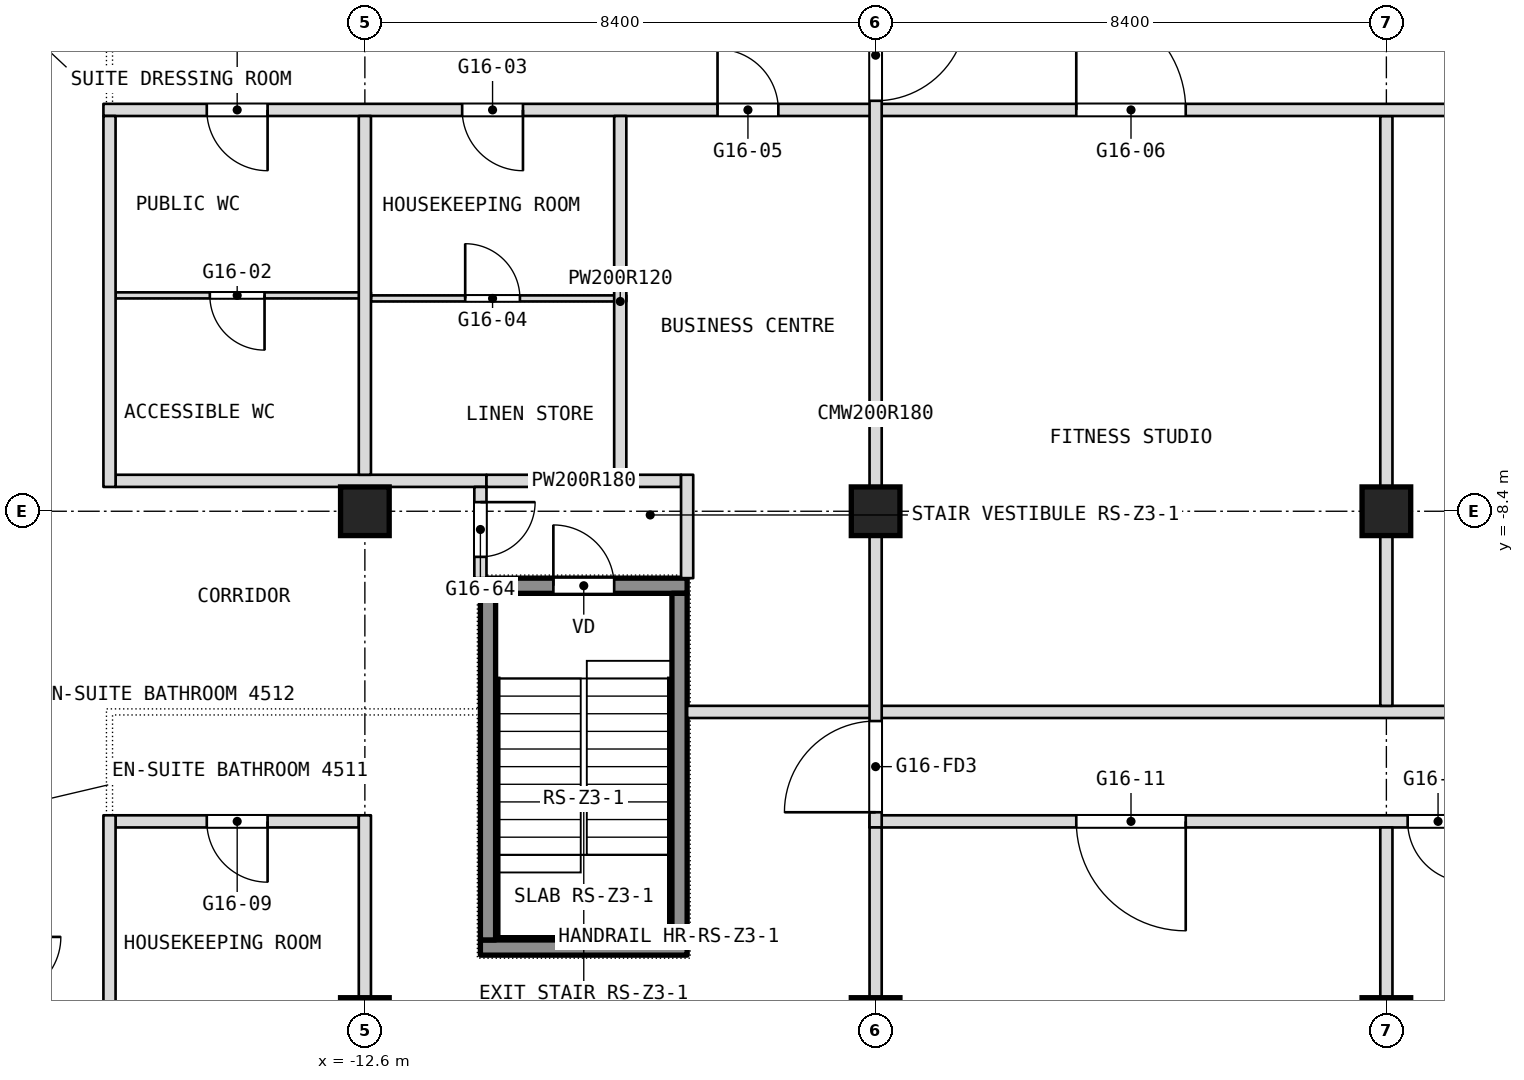
"""IFC4 building model, lengths in metres.
Left out: names, types, materials, properties, quantities, classifications, styles, units other than length and angle.
Written with IfcOpenShell. Run it as: python <this file> out.ifc"""

import sys

from ifc_helpers import new_model, si_unit, direction, frame, frame_2d, origin, origin_2d, place, context, subcontext, project, spatial, rectangle, extrude, element, fill, save


model = new_model("IFC4")
c1 = context("Model", 3, precision=1e-05, world=origin(), true_north=direction((0.0, 1.0)))
c2 = subcontext(c1, "Body", "Model", "MODEL_VIEW")
j1 = project(units=[si_unit("LENGTHUNIT", "METRE"), si_unit("PLANEANGLEUNIT", "RADIAN")], contexts=[c1])
p1 = place(None, origin())
s1 = spatial("IfcSite", under=j1, at=p1, CompositionType="ELEMENT")
p2 = place(p1, origin())
s2 = spatial("IfcBuilding", under=s1, at=p2, CompositionType="ELEMENT")
p3 = place(p2, frame((0.0, 0.0, 198.5)))
s3 = spatial("IfcBuildingStorey", under=s2, at=p3, CompositionType="ELEMENT", Elevation=198.5)
for number, where, z_axis, x_axis in (
    (1, (-12.6, -16.8, 0.0), (0.0, 0.0, 1.0), (1.0, 0.0, 0.0)),
    (2, (-12.6, -8.4, 0.0), (0.0, 0.0, 1.0), (1.0, 0.0, 0.0)),
    (3, (-4.2, -16.8, 0.0), (0.0, 0.0, 1.0), (1.0, 0.0, 0.0)),
    (4, (-4.2, -8.4, 0.0), (0.0, 0.0, 1.0), (1.0, 0.0, 0.0)),
    (5, (4.2, -16.8, 0.0), (0.0, 0.0, 1.0), (1.0, 0.0, 0.0)),
    (6, (4.2, -8.4, 0.0), (0.0, 0.0, 1.0), (1.0, 0.0, 0.0)),
):
    element("IfcColumn", number, at=place(p3, frame(where, z_axis=z_axis, x_axis=x_axis)), inside=s3, PredefinedType="COLUMN", context=c2, shape_type="SweptSolid", body=[
        extrude(rectangle(XDim=0.8, YDim=0.8, at=origin_2d()), origin(), (0.0, 0.0, 1.0), 3.6),
    ])
p4 = place(p3, frame((-16.7, -13.5, 0.0), z_axis=(0.0, 0.0, 1.0), x_axis=(1.0, 0.0, 0.0)))
e7 = element("IfcWall", 7, at=p4, inside=s3, PredefinedType="PARTITIONING", context=c2, shape_type="SweptSolid", body=[
    extrude(rectangle(XDim=4.0, YDim=0.2, at=frame_2d((2.0, 0.0))), origin(), (0.0, 0.0, 1.0), 3.34),
])
p5 = place(p4, frame((1.5, 0.0, 0.0)))
e8 = element("IfcOpeningElement", 8, at=p5, cuts=e7, PredefinedType="OPENING", context=c2, shape_type="SweptSolid", body=[
    extrude(rectangle(XDim=1.0, YDim=2.1, at=frame_2d((0.5, 1.05))), frame((0.0, 0.1, 0.0), z_axis=(0.0, -1.0, 0.0), x_axis=(1.0, 0.0, 0.0)), (0.0, 0.0, 1.0), 0.2),
])
p6 = place(p3, frame((-4.3, -13.5, 0.0), z_axis=(0.0, 0.0, 1.0), x_axis=(1.0, 0.0, 0.0)))
e9 = element("IfcWall", 9, at=p6, inside=s3, PredefinedType="PARTITIONING", context=c2, shape_type="SweptSolid", body=[
    extrude(rectangle(XDim=10.0, YDim=0.2, at=frame_2d((5.0, 0.0))), origin(), (0.0, 0.0, 1.0), 3.34),
])
p7 = place(p6, frame((3.4, 0.0, 0.0)))
e10 = element("IfcOpeningElement", 10, at=p7, cuts=e9, PredefinedType="OPENING", context=c2, shape_type="SweptSolid", body=[
    extrude(rectangle(XDim=1.8, YDim=2.1, at=frame_2d((0.9, 1.05))), frame((0.0, 0.1, 0.0), z_axis=(0.0, -1.0, 0.0), x_axis=(1.0, 0.0, 0.0)), (0.0, 0.0, 1.0), 0.2),
])
p8 = place(p6, frame((8.85, 0.0, 0.0)))
e11 = element("IfcOpeningElement", 11, at=p8, cuts=e9, PredefinedType="OPENING", context=c2, shape_type="SweptSolid", body=[
    extrude(rectangle(XDim=1.0, YDim=2.1, at=frame_2d((0.5, 1.05))), frame((0.0, 0.1, 0.0), z_axis=(0.0, -1.0, 0.0), x_axis=(1.0, 0.0, 0.0)), (0.0, 0.0, 1.0), 0.2),
])
p9 = place(p3, frame((-7.3, -11.7, 0.0), z_axis=(0.0, 0.0, 1.0), x_axis=(1.0, 0.0, 0.0)))
e12 = element("IfcWall", 12, at=p9, inside=s3, PredefinedType="PARTITIONING", context=c2, shape_type="SweptSolid", body=[
    extrude(rectangle(XDim=14.6, YDim=0.2, at=frame_2d((7.3, 0.0))), origin(), (0.0, 0.0, 1.0), 3.34),
])
p10 = place(p3, frame((-16.7, -7.9, 0.0), z_axis=(0.0, 0.0, 1.0), x_axis=(1.0, 0.0, 0.0)))
e13 = element("IfcWall", 13, at=p10, inside=s3, PredefinedType="PARTITIONING", context=c2, shape_type="SweptSolid", body=[
    extrude(rectangle(XDim=6.1, YDim=0.2, at=frame_2d((3.05, 0.0))), origin(), (0.0, 0.0, 1.0), 3.34),
])
p11 = place(p3, frame((-10.6, -7.9, 0.0), z_axis=(0.0, 0.0, 1.0), x_axis=(1.0, 0.0, 0.0)))
e14 = element("IfcWall", 14, at=p11, inside=s3, PredefinedType="PARTITIONING", context=c2, shape_type="SweptSolid", body=[
    extrude(rectangle(XDim=3.2, YDim=0.2, at=frame_2d((1.6, 0.0))), origin(), (0.0, 0.0, 1.0), 3.34),
])
p12 = place(p3, frame((-12.5, -4.9, 0.0), z_axis=(0.0, 0.0, 1.0), x_axis=(1.0, 0.0, 0.0)))
e15 = element("IfcWall", 15, at=p12, inside=s3, PredefinedType="PARTITIONING", context=c2, shape_type="SweptSolid", body=[
    extrude(rectangle(XDim=4.2, YDim=0.1, at=frame_2d((2.1, 0.0))), origin(), (0.0, 0.0, 1.0), 3.34),
])
p13 = place(p12, frame((1.55, 0.0, 0.0)))
e16 = element("IfcOpeningElement", 16, at=p13, cuts=e15, PredefinedType="OPENING", context=c2, shape_type="SweptSolid", body=[
    extrude(rectangle(XDim=0.9, YDim=2.1, at=frame_2d((0.45, 1.05))), frame((0.0, 0.05, 0.0), z_axis=(0.0, -1.0, 0.0), x_axis=(1.0, 0.0, 0.0)), (0.0, 0.0, 1.0), 0.1),
])
p14 = place(p3, frame((-16.7, -4.85, 0.0), z_axis=(0.0, 0.0, 1.0), x_axis=(1.0, 0.0, 0.0)))
e17 = element("IfcWall", 17, at=p14, inside=s3, PredefinedType="PARTITIONING", context=c2, shape_type="SweptSolid", body=[
    extrude(rectangle(XDim=4.2, YDim=0.1, at=frame_2d((2.1, 0.0))), origin(), (0.0, 0.0, 1.0), 3.34),
])
p15 = place(p14, frame((1.55, 0.0, 0.0)))
e18 = element("IfcOpeningElement", 18, at=p15, cuts=e17, PredefinedType="OPENING", context=c2, shape_type="SweptSolid", body=[
    extrude(rectangle(XDim=0.9, YDim=2.1, at=frame_2d((0.45, 1.05))), frame((0.0, 0.05, 0.0), z_axis=(0.0, -1.0, 0.0), x_axis=(1.0, 0.0, 0.0)), (0.0, 0.0, 1.0), 0.1),
])
p16 = place(p3, frame((4.2, -20.0, 0.0), z_axis=(0.0, 0.0, 1.0), x_axis=(0.0, 1.0, 0.0)))
e19 = element("IfcWall", 19, at=p16, inside=s3, PredefinedType="PARTITIONING", context=c2, shape_type="SweptSolid", body=[
    extrude(rectangle(XDim=6.4, YDim=0.2, at=frame_2d((3.2, 0.0))), origin(), (0.0, 0.0, 1.0), 3.34),
])
p17 = place(p3, frame((4.2, -11.6, 0.0), z_axis=(0.0, 0.0, 1.0), x_axis=(0.0, 1.0, 0.0)))
e20 = element("IfcWall", 20, at=p17, inside=s3, PredefinedType="PARTITIONING", context=c2, shape_type="SweptSolid", body=[
    extrude(rectangle(XDim=9.7, YDim=0.2, at=frame_2d((4.85, 0.0))), origin(), (0.0, 0.0, 1.0), 3.34),
])
p18 = place(p3, frame((-16.9, -1.8, 0.0), z_axis=(0.0, 0.0, 1.0), x_axis=(1.0, 0.0, 0.0)))
e21 = element("IfcWall", 21, at=p18, inside=s3, PredefinedType="PARTITIONING", context=c2, shape_type="SweptSolid", body=[
    extrude(rectangle(XDim=33.8, YDim=0.2, at=frame_2d((16.9, 0.0))), origin(), (0.0, 0.0, 1.0), 3.34),
])
p19 = place(p18, frame((1.7, 0.0, 0.0)))
e22 = element("IfcOpeningElement", 22, at=p19, cuts=e21, PredefinedType="OPENING", context=c2, shape_type="SweptSolid", body=[
    extrude(rectangle(XDim=1.0, YDim=2.1, at=frame_2d((0.5, 1.05))), frame((0.0, 0.1, 0.0), z_axis=(0.0, -1.0, 0.0), x_axis=(1.0, 0.0, 0.0)), (0.0, 0.0, 1.0), 0.2),
])
p20 = place(p18, frame((5.9, 0.0, 0.0)))
e23 = element("IfcOpeningElement", 23, at=p20, cuts=e21, PredefinedType="OPENING", context=c2, shape_type="SweptSolid", body=[
    extrude(rectangle(XDim=1.0, YDim=2.1, at=frame_2d((0.5, 1.05))), frame((0.0, 0.1, 0.0), z_axis=(0.0, -1.0, 0.0), x_axis=(1.0, 0.0, 0.0)), (0.0, 0.0, 1.0), 0.2),
])
p21 = place(p18, frame((10.1, 0.0, 0.0)))
e24 = element("IfcOpeningElement", 24, at=p21, cuts=e21, PredefinedType="OPENING", context=c2, shape_type="SweptSolid", body=[
    extrude(rectangle(XDim=1.0, YDim=2.1, at=frame_2d((0.5, 1.05))), frame((0.0, 0.1, 0.0), z_axis=(0.0, -1.0, 0.0), x_axis=(1.0, 0.0, 0.0)), (0.0, 0.0, 1.0), 0.2),
])
p22 = place(p18, frame((16.0, 0.0, 0.0)))
e25 = element("IfcOpeningElement", 25, at=p22, cuts=e21, PredefinedType="OPENING", context=c2, shape_type="SweptSolid", body=[
    extrude(rectangle(XDim=1.8, YDim=2.1, at=frame_2d((0.9, 1.05))), frame((0.0, 0.1, 0.0), z_axis=(0.0, -1.0, 0.0), x_axis=(1.0, 0.0, 0.0)), (0.0, 0.0, 1.0), 0.2),
])
p23 = place(p18, frame((24.4, 0.0, 0.0)))
e26 = element("IfcOpeningElement", 26, at=p23, cuts=e21, PredefinedType="OPENING", context=c2, shape_type="SweptSolid", body=[
    extrude(rectangle(XDim=1.8, YDim=2.1, at=frame_2d((0.9, 1.05))), frame((0.0, 0.1, 0.0), z_axis=(0.0, -1.0, 0.0), x_axis=(1.0, 0.0, 0.0)), (0.0, 0.0, 1.0), 0.2),
])
p24 = place(p18, frame((31.1, 0.0, 0.0)))
e27 = element("IfcOpeningElement", 27, at=p24, cuts=e21, PredefinedType="OPENING", context=c2, shape_type="SweptSolid", body=[
    extrude(rectangle(XDim=1.0, YDim=2.1, at=frame_2d((0.5, 1.05))), frame((0.0, 0.1, 0.0), z_axis=(0.0, -1.0, 0.0), x_axis=(1.0, 0.0, 0.0)), (0.0, 0.0, 1.0), 0.2),
])
p25 = place(p3, frame((-4.2, -13.6, 0.0), z_axis=(0.0, 0.0, 1.0), x_axis=(0.0, 1.0, 0.0)))
e28 = element("IfcWall", 28, at=p25, inside=s3, PredefinedType="PARTITIONING", context=c2, shape_type="SweptSolid", body=[
    extrude(rectangle(XDim=13.6, YDim=0.2, at=frame_2d((6.8, 0.0))), origin(), (0.0, 0.0, 1.0), 3.34),
])
p26 = place(p25, frame((11.95, 0.0, 0.0)))
e29 = element("IfcOpeningElement", 29, at=p26, cuts=e28, PredefinedType="OPENING", context=c2, shape_type="SweptSolid", body=[
    extrude(rectangle(XDim=1.5, YDim=2.1, at=frame_2d((0.75, 1.05))), frame((0.0, 0.1, 0.0), z_axis=(0.0, -1.0, 0.0), x_axis=(1.0, 0.0, 0.0)), (0.0, 0.0, 1.0), 0.2),
])
p27 = place(p25, frame((0.25, 0.0, 0.0)))
e30 = element("IfcOpeningElement", 30, at=p27, cuts=e28, PredefinedType="OPENING", context=c2, shape_type="SweptSolid", body=[
    extrude(rectangle(XDim=1.5, YDim=2.1, at=frame_2d((0.75, 1.05))), frame((0.0, 0.1, 0.0), z_axis=(0.0, -1.0, 0.0), x_axis=(1.0, 0.0, 0.0)), (0.0, 0.0, 1.0), 0.2),
])
p28 = place(p3, frame((-4.2, -22.0, 0.0), z_axis=(0.0, 0.0, 1.0), x_axis=(0.0, 1.0, 0.0)))
e31 = element("IfcWall", 31, at=p28, inside=s3, PredefinedType="PARTITIONING", context=c2, shape_type="SweptSolid", body=[
    extrude(rectangle(XDim=8.4, YDim=0.2, at=frame_2d((4.2, 0.0))), origin(), (0.0, 0.0, 1.0), 3.34),
])
p29 = place(p28, frame((0.225, 0.0, 0.0)))
e32 = element("IfcOpeningElement", 32, at=p29, cuts=e31, PredefinedType="OPENING", context=c2, shape_type="SweptSolid", body=[
    extrude(rectangle(XDim=1.5, YDim=2.1, at=frame_2d((0.75, 1.05))), frame((0.0, 0.1, 0.0), z_axis=(0.0, -1.0, 0.0), x_axis=(1.0, 0.0, 0.0)), (0.0, 0.0, 1.0), 0.2),
])
p30 = place(p3, frame((-7.3, -9.5, 0.0), z_axis=(0.0, 0.0, 1.0), x_axis=(0.0, 1.0, 0.0)))
e33 = element("IfcWall", 33, at=p30, inside=s3, PredefinedType="PARTITIONING", context=c2, shape_type="SweptSolid", body=[
    extrude(rectangle(XDim=1.7, YDim=0.2, at=frame_2d((0.85, 0.0))), origin(), (0.0, 0.0, 1.0), 3.34),
])
p31 = place(p3, frame((-8.4, -8.0, 0.0), z_axis=(0.0, 0.0, 1.0), x_axis=(0.0, 1.0, 0.0)))
e34 = element("IfcWall", 34, at=p31, inside=s3, PredefinedType="PARTITIONING", context=c2, shape_type="SweptSolid", body=[
    extrude(rectangle(XDim=6.1, YDim=0.2, at=frame_2d((3.05, 0.0))), origin(), (0.0, 0.0, 1.0), 3.34),
])
p32 = place(p3, frame((-10.7, -9.5, 0.0), z_axis=(0.0, 0.0, 1.0), x_axis=(0.0, 1.0, 0.0)))
e35 = element("IfcWall", 35, at=p32, inside=s3, PredefinedType="PARTITIONING", context=c2, shape_type="SweptSolid", body=[
    extrude(rectangle(XDim=1.5, YDim=0.2, at=frame_2d((0.75, 0.0))), origin(), (0.0, 0.0, 1.0), 3.34),
])
p33 = place(p32, frame((0.35, 0.0, 0.0)))
e36 = element("IfcOpeningElement", 36, at=p33, cuts=e35, PredefinedType="OPENING", context=c2, shape_type="SweptSolid", body=[
    extrude(rectangle(XDim=0.9, YDim=2.1, at=frame_2d((0.45, 1.05))), frame((0.0, 0.1, 0.0), z_axis=(0.0, -1.0, 0.0), x_axis=(1.0, 0.0, 0.0)), (0.0, 0.0, 1.0), 0.2),
])
p34 = place(p3, frame((-12.6, -7.8, 0.0), z_axis=(0.0, 0.0, 1.0), x_axis=(0.0, 1.0, 0.0)))
e37 = element("IfcWall", 37, at=p34, inside=s3, PredefinedType="PARTITIONING", context=c2, shape_type="SweptSolid", body=[
    extrude(rectangle(XDim=5.9, YDim=0.2, at=frame_2d((2.95, 0.0))), origin(), (0.0, 0.0, 1.0), 3.34),
])
for number, where, z_axis, x_axis in (
    (38, (-12.6, -20.2, 0.0), (0.0, 0.0, 1.0), (0.0, 1.0, 0.0)),
    (39, (-16.8, -20.2, 0.0), (0.0, 0.0, 1.0), (0.0, 1.0, 0.0)),
):
    element("IfcWall", number, at=place(p3, frame(where, z_axis=z_axis, x_axis=x_axis)), inside=s3, PredefinedType="PARTITIONING", context=c2, shape_type="SweptSolid", body=[
        extrude(rectangle(XDim=6.8, YDim=0.2, at=frame_2d((3.4, 0.0))), origin(), (0.0, 0.0, 1.0), 3.34),
    ])
p35 = place(p3, frame((-16.8, -8.0, 0.0), z_axis=(0.0, 0.0, 1.0), x_axis=(0.0, 1.0, 0.0)))
e40 = element("IfcWall", 40, at=p35, inside=s3, PredefinedType="PARTITIONING", context=c2, shape_type="SweptSolid", body=[
    extrude(rectangle(XDim=6.1, YDim=0.2, at=frame_2d((3.05, 0.0))), origin(), (0.0, 0.0, 1.0), 3.34),
])
p36 = place(p3, frame((-10.7, -15.575, 0.1), z_axis=(0.0, 0.0, 1.0), x_axis=(1.0, 0.0, 0.0)))
e41 = element("IfcWall", 41, at=p36, inside=s3, PredefinedType="SHEAR", context=c2, shape_type="SweptSolid", body=[
    extrude(rectangle(XDim=3.4, YDim=0.25, at=frame_2d((1.7, 0.0))), origin(), (0.0, 0.0, 1.0), 3.6),
])
p37 = place(p3, frame((-10.7, -9.625, 0.1), z_axis=(0.0, 0.0, 1.0), x_axis=(1.0, 0.0, 0.0)))
e42 = element("IfcWall", 42, at=p37, inside=s3, PredefinedType="SHEAR", context=c2, shape_type="SweptSolid", body=[
    extrude(rectangle(XDim=3.4, YDim=0.25, at=frame_2d((1.7, 0.0))), origin(), (0.0, 0.0, 1.0), 3.6),
])
p38 = place(p37, frame((1.2, 0.0, 0.0)))
e43 = element("IfcOpeningElement", 43, at=p38, cuts=e42, PredefinedType="OPENING", context=c2, shape_type="SweptSolid", body=[
    extrude(rectangle(XDim=1.0, YDim=2.1, at=frame_2d((0.5, 1.05))), frame((0.0, 0.125, 0.0), z_axis=(0.0, -1.0, 0.0), x_axis=(1.0, 0.0, 0.0)), (0.0, 0.0, 1.0), 0.25),
])
for number, where, z_axis, x_axis in (
    (44, (-10.575, -15.45, 0.1), (0.0, 0.0, 1.0), (0.0, 1.0, 0.0)),
    (45, (-7.425, -15.45, 0.1), (0.0, 0.0, 1.0), (0.0, 1.0, 0.0)),
):
    element("IfcWall", number, at=place(p3, frame(where, z_axis=z_axis, x_axis=x_axis)), inside=s3, PredefinedType="SHEAR", context=c2, shape_type="SweptSolid", body=[
        extrude(rectangle(XDim=5.7, YDim=0.25, at=frame_2d((2.85, 0.0))), origin(), (0.0, 0.0, 1.0), 3.6),
    ])
p39 = place(p5, origin())
e46 = element("IfcDoor", 46, at=p39, inside=s3, OperationType="SINGLE_SWING_LEFT", PredefinedType="DOOR", context=c2, shape_type="SweptSolid", body=[
    extrude(rectangle(XDim=1.0, YDim=2.1, at=frame_2d((0.5, 1.05))), frame((0.0, 0.025, 0.0), z_axis=(0.0, -1.0, 0.0), x_axis=(1.0, 0.0, 0.0)), (0.0, 0.0, 1.0), 0.05),
])
fill(e8, e46)
p40 = place(p7, origin())
e47 = element("IfcDoor", 47, at=p40, inside=s3, OperationType="DOUBLE_DOOR_SINGLE_SWING", PredefinedType="DOOR", context=c2, shape_type="SweptSolid", body=[
    extrude(rectangle(XDim=1.8, YDim=2.1, at=frame_2d((0.9, 1.05))), frame((0.0, 0.025, 0.0), z_axis=(0.0, -1.0, 0.0), x_axis=(1.0, 0.0, 0.0)), (0.0, 0.0, 1.0), 0.05),
])
fill(e10, e47)
p41 = place(p8, origin())
e48 = element("IfcDoor", 48, at=p41, inside=s3, OperationType="SINGLE_SWING_LEFT", PredefinedType="DOOR", context=c2, shape_type="SweptSolid", body=[
    extrude(rectangle(XDim=1.0, YDim=2.1, at=frame_2d((0.5, 1.05))), frame((0.0, 0.025, 0.0), z_axis=(0.0, -1.0, 0.0), x_axis=(1.0, 0.0, 0.0)), (0.0, 0.0, 1.0), 0.05),
])
fill(e11, e48)
p42 = place(p13, origin())
e49 = element("IfcDoor", 49, at=p42, inside=s3, OperationType="SINGLE_SWING_RIGHT", PredefinedType="DOOR", context=c2, shape_type="SweptSolid", body=[
    extrude(rectangle(XDim=0.9, YDim=2.1, at=frame_2d((0.45, 1.05))), frame((0.0, 0.025, 0.0), z_axis=(0.0, -1.0, 0.0), x_axis=(1.0, 0.0, 0.0)), (0.0, 0.0, 1.0), 0.05),
])
fill(e16, e49)
p43 = place(p15, origin())
e50 = element("IfcDoor", 50, at=p43, inside=s3, OperationType="SINGLE_SWING_RIGHT", PredefinedType="DOOR", context=c2, shape_type="SweptSolid", body=[
    extrude(rectangle(XDim=0.9, YDim=2.1, at=frame_2d((0.45, 1.05))), frame((0.0, 0.025, 0.0), z_axis=(0.0, -1.0, 0.0), x_axis=(1.0, 0.0, 0.0)), (0.0, 0.0, 1.0), 0.05),
])
fill(e18, e50)
p44 = place(p19, origin())
e51 = element("IfcDoor", 51, at=p44, inside=s3, OperationType="SINGLE_SWING_LEFT", PredefinedType="DOOR", context=c2, shape_type="SweptSolid", body=[
    extrude(rectangle(XDim=1.0, YDim=2.1, at=frame_2d((0.5, 1.05))), frame((0.0, 0.025, 0.0), z_axis=(0.0, -1.0, 0.0), x_axis=(1.0, 0.0, 0.0)), (0.0, 0.0, 1.0), 0.05),
])
fill(e22, e51)
p45 = place(p20, origin())
e52 = element("IfcDoor", 52, at=p45, inside=s3, OperationType="SINGLE_SWING_LEFT", PredefinedType="DOOR", context=c2, shape_type="SweptSolid", body=[
    extrude(rectangle(XDim=1.0, YDim=2.1, at=frame_2d((0.5, 1.05))), frame((0.0, 0.025, 0.0), z_axis=(0.0, -1.0, 0.0), x_axis=(1.0, 0.0, 0.0)), (0.0, 0.0, 1.0), 0.05),
])
fill(e23, e52)
p46 = place(p21, origin())
e53 = element("IfcDoor", 53, at=p46, inside=s3, OperationType="SINGLE_SWING_RIGHT", PredefinedType="DOOR", context=c2, shape_type="SweptSolid", body=[
    extrude(rectangle(XDim=1.0, YDim=2.1, at=frame_2d((0.5, 1.05))), frame((0.0, 0.025, 0.0), z_axis=(0.0, -1.0, 0.0), x_axis=(1.0, 0.0, 0.0)), (0.0, 0.0, 1.0), 0.05),
])
fill(e24, e53)
p47 = place(p22, origin())
e54 = element("IfcDoor", 54, at=p47, inside=s3, OperationType="DOUBLE_DOOR_SINGLE_SWING", PredefinedType="DOOR", context=c2, shape_type="SweptSolid", body=[
    extrude(rectangle(XDim=1.8, YDim=2.1, at=frame_2d((0.9, 1.05))), frame((0.0, 0.025, 0.0), z_axis=(0.0, -1.0, 0.0), x_axis=(1.0, 0.0, 0.0)), (0.0, 0.0, 1.0), 0.05),
])
fill(e25, e54)
p48 = place(p33, origin())
e55 = element("IfcDoor", 55, at=p48, inside=s3, OperationType="SINGLE_SWING_LEFT", PredefinedType="DOOR", context=c2, shape_type="SweptSolid", body=[
    extrude(rectangle(XDim=0.9, YDim=2.1, at=frame_2d((0.45, 1.05))), frame((0.0, 0.025, 0.0), z_axis=(0.0, -1.0, 0.0), x_axis=(1.0, 0.0, 0.0)), (0.0, 0.0, 1.0), 0.05),
])
fill(e36, e55)
p49 = place(p38, origin())
e56 = element("IfcDoor", 56, at=p49, inside=s3, OperationType="SINGLE_SWING_LEFT", PredefinedType="DOOR", context=c2, shape_type="SweptSolid", body=[
    extrude(rectangle(XDim=1.0, YDim=2.1, at=frame_2d((0.5, 1.05))), frame((0.0, 0.025, 0.0), z_axis=(0.0, -1.0, 0.0), x_axis=(1.0, 0.0, 0.0)), (0.0, 0.0, 1.0), 0.05),
])
fill(e43, e56)
p50 = place(p26, origin())
e57 = element("IfcDoor", 57, at=p50, inside=s3, OperationType="DOUBLE_DOOR_DOUBLE_SWING", PredefinedType="DOOR", context=c2, shape_type="SweptSolid", body=[
    extrude(rectangle(XDim=1.5, YDim=2.1, at=frame_2d((0.75, 1.05))), frame((0.0, 0.025, 0.0), z_axis=(0.0, -1.0, 0.0), x_axis=(1.0, 0.0, 0.0)), (0.0, 0.0, 1.0), 0.05),
])
fill(e29, e57)
p51 = place(p27, origin())
e58 = element("IfcDoor", 58, at=p51, inside=s3, OperationType="DOUBLE_DOOR_DOUBLE_SWING", PredefinedType="DOOR", context=c2, shape_type="SweptSolid", body=[
    extrude(rectangle(XDim=1.5, YDim=2.1, at=frame_2d((0.75, 1.05))), frame((0.0, 0.025, 0.0), z_axis=(0.0, -1.0, 0.0), x_axis=(1.0, 0.0, 0.0)), (0.0, 0.0, 1.0), 0.05),
])
fill(e30, e58)
save(model, sys.argv[1])
